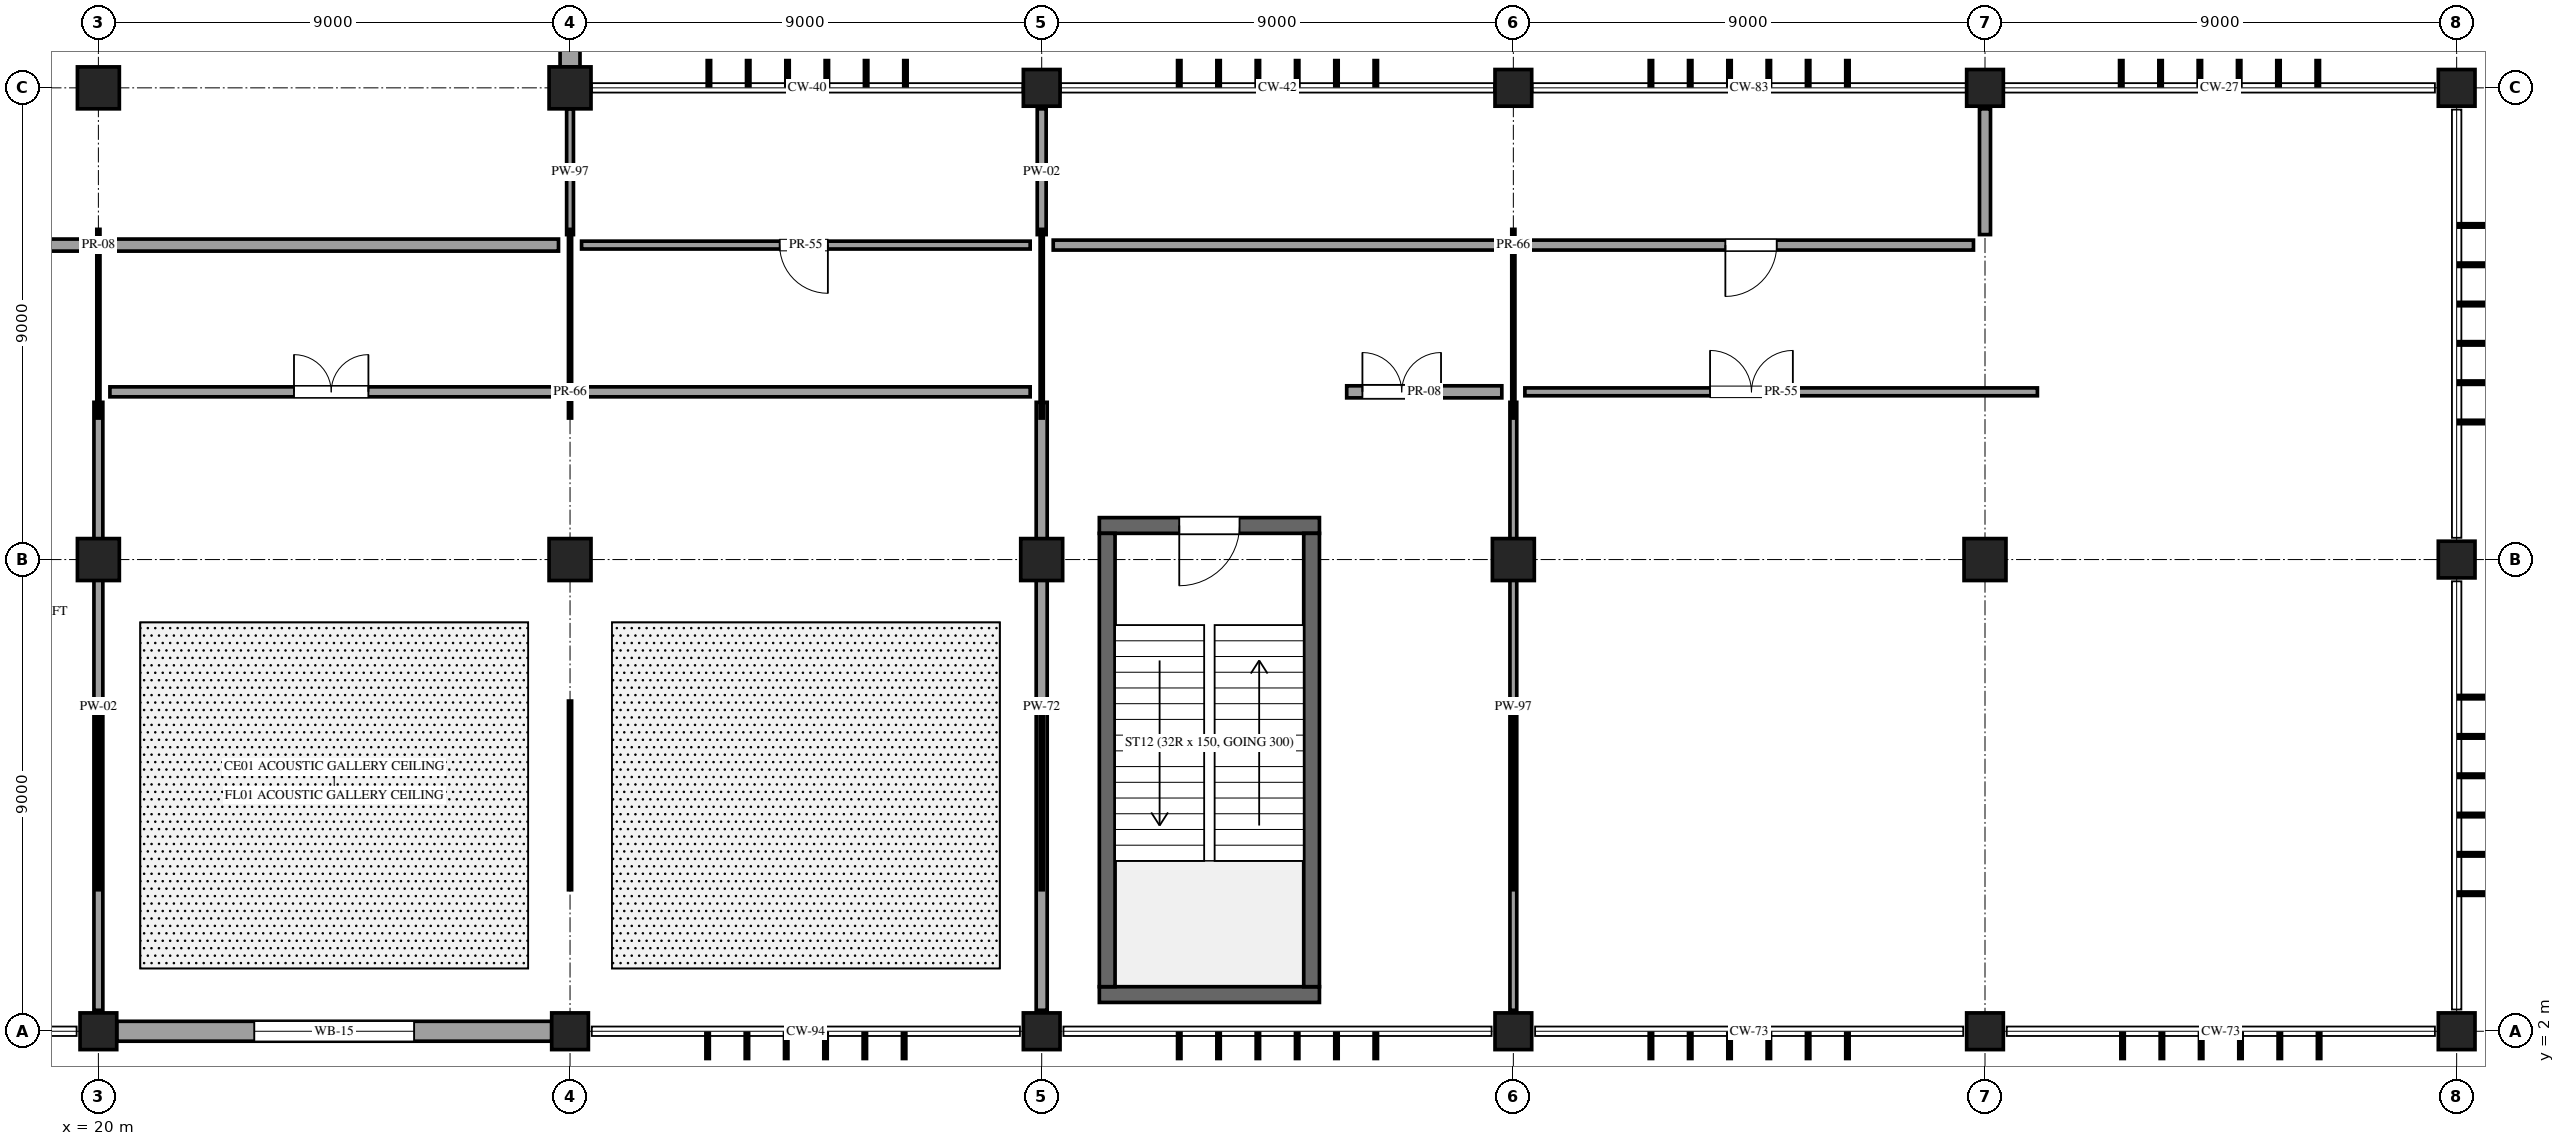
"""IFC4 building model, lengths in metres.
Left out: names, types, materials, properties, quantities, classifications, styles, units other than length and angle.
Written with IfcOpenShell. Run it as: python <this file> out.ifc"""

import sys

from ifc_helpers import new_model, si_unit, direction, frame, frame_2d, origin, origin_2d, place, context, subcontext, project, spatial, rectangle, circle, extrude, element, fill, save


model = new_model("IFC4")
c1 = context("Model", 3, precision=1e-05, world=origin(), true_north=direction((0.0, 1.0)))
c2 = subcontext(c1, "Body", "Model", "MODEL_VIEW")
j1 = project(units=[si_unit("LENGTHUNIT", "METRE"), si_unit("PLANEANGLEUNIT", "RADIAN")], contexts=[c1])
p1 = place(None, origin())
s1 = spatial("IfcSite", under=j1, at=p1, CompositionType="ELEMENT")
p2 = place(p1, origin())
s2 = spatial("IfcBuilding", under=s1, at=p2, CompositionType="ELEMENT")
p3 = place(p2, frame((0.0, 0.0, 5.4)))
s3 = spatial("IfcBuildingStorey", under=s2, at=p3, CompositionType="ELEMENT", Elevation=5.4)
p4 = place(p3, frame((20.0, 2.0, 0.0), z_axis=(0.0, 0.0, 1.0), x_axis=(1.0, 0.0, 0.0)))
e1 = element("IfcColumn", 1, at=p4, inside=s3, PredefinedType="COLUMN", context=c2, shape_type="SweptSolid", body=[
    extrude(rectangle(XDim=0.7, YDim=0.7, at=origin_2d()), origin(), (0.0, 0.0, 1.0), 4.8),
])
for number, where, z_axis, x_axis in (
    (2, (20.0, 11.0, 0.0), (0.0, 0.0, 1.0), (1.0, 0.0, 0.0)),
    (3, (20.0, 20.0, 0.0), (0.0, 0.0, 1.0), (1.0, 0.0, 0.0)),
):
    element("IfcColumn", number, at=place(p3, frame(where, z_axis=z_axis, x_axis=x_axis)), inside=s3, PredefinedType="COLUMN", context=c2, shape_type="SweptSolid", body=[
        extrude(circle(Radius=0.4, at=origin_2d()), origin(), (0.0, 0.0, 1.0), 4.8),
    ])
p5 = place(p3, frame((29.0, 2.0, 0.0), z_axis=(0.0, 0.0, 1.0), x_axis=(1.0, 0.0, 0.0)))
e4 = element("IfcColumn", 4, at=p5, inside=s3, PredefinedType="COLUMN", context=c2, shape_type="SweptSolid", body=[
    extrude(rectangle(XDim=0.7, YDim=0.7, at=origin_2d()), origin(), (0.0, 0.0, 1.0), 4.8),
])
for number, where, z_axis, x_axis in (
    (5, (29.0, 11.0, 0.0), (0.0, 0.0, 1.0), (1.0, 0.0, 0.0)),
    (6, (29.0, 20.0, 0.0), (0.0, 0.0, 1.0), (1.0, 0.0, 0.0)),
):
    element("IfcColumn", number, at=place(p3, frame(where, z_axis=z_axis, x_axis=x_axis)), inside=s3, PredefinedType="COLUMN", context=c2, shape_type="SweptSolid", body=[
        extrude(circle(Radius=0.4, at=origin_2d()), origin(), (0.0, 0.0, 1.0), 4.8),
    ])
p6 = place(p3, frame((38.0, 2.0, 0.0), z_axis=(0.0, 0.0, 1.0), x_axis=(1.0, 0.0, 0.0)))
e7 = element("IfcColumn", 7, at=p6, inside=s3, PredefinedType="COLUMN", context=c2, shape_type="SweptSolid", body=[
    extrude(rectangle(XDim=0.7, YDim=0.7, at=origin_2d()), origin(), (0.0, 0.0, 1.0), 4.8),
])
p7 = place(p3, frame((38.0, 11.0, 0.0), z_axis=(0.0, 0.0, 1.0), x_axis=(1.0, 0.0, 0.0)))
e8 = element("IfcColumn", 8, at=p7, inside=s3, PredefinedType="COLUMN", context=c2, shape_type="SweptSolid", body=[
    extrude(circle(Radius=0.4, at=origin_2d()), origin(), (0.0, 0.0, 1.0), 4.8),
])
for number, where, z_axis, x_axis in (
    (9, (38.0, 20.0, 0.0), (0.0, 0.0, 1.0), (1.0, 0.0, 0.0)),
    (10, (47.0, 2.0, 0.0), (0.0, 0.0, 1.0), (1.0, 0.0, 0.0)),
):
    element("IfcColumn", number, at=place(p3, frame(where, z_axis=z_axis, x_axis=x_axis)), inside=s3, PredefinedType="COLUMN", context=c2, shape_type="SweptSolid", body=[
        extrude(rectangle(XDim=0.7, YDim=0.7, at=origin_2d()), origin(), (0.0, 0.0, 1.0), 4.8),
    ])
p8 = place(p3, frame((47.0, 11.0, 0.0), z_axis=(0.0, 0.0, 1.0), x_axis=(1.0, 0.0, 0.0)))
e11 = element("IfcColumn", 11, at=p8, inside=s3, PredefinedType="COLUMN", context=c2, shape_type="SweptSolid", body=[
    extrude(circle(Radius=0.4, at=origin_2d()), origin(), (0.0, 0.0, 1.0), 4.8),
])
for number, where, z_axis, x_axis in (
    (12, (47.0, 20.0, 0.0), (0.0, 0.0, 1.0), (1.0, 0.0, 0.0)),
    (13, (56.0, 2.0, 0.0), (0.0, 0.0, 1.0), (1.0, 0.0, 0.0)),
):
    element("IfcColumn", number, at=place(p3, frame(where, z_axis=z_axis, x_axis=x_axis)), inside=s3, PredefinedType="COLUMN", context=c2, shape_type="SweptSolid", body=[
        extrude(rectangle(XDim=0.7, YDim=0.7, at=origin_2d()), origin(), (0.0, 0.0, 1.0), 4.8),
    ])
p9 = place(p3, frame((56.0, 11.0, 0.0), z_axis=(0.0, 0.0, 1.0), x_axis=(1.0, 0.0, 0.0)))
e14 = element("IfcColumn", 14, at=p9, inside=s3, PredefinedType="COLUMN", context=c2, shape_type="SweptSolid", body=[
    extrude(circle(Radius=0.4, at=origin_2d()), origin(), (0.0, 0.0, 1.0), 4.8),
])
for number, where, z_axis, x_axis in (
    (15, (56.0, 20.0, 0.0), (0.0, 0.0, 1.0), (1.0, 0.0, 0.0)),
    (16, (65.0, 2.0, 0.0), (0.0, 0.0, 1.0), (1.0, 0.0, 0.0)),
    (17, (65.0, 11.0, 0.0), (0.0, 0.0, 1.0), (1.0, 0.0, 0.0)),
    (18, (65.0, 20.0, 0.0), (0.0, 0.0, 1.0), (1.0, 0.0, 0.0)),
):
    element("IfcColumn", number, at=place(p3, frame(where, z_axis=z_axis, x_axis=x_axis)), inside=s3, PredefinedType="COLUMN", context=c2, shape_type="SweptSolid", body=[
        extrude(rectangle(XDim=0.7, YDim=0.7, at=origin_2d()), origin(), (0.0, 0.0, 1.0), 4.8),
    ])
p10 = place(p3, frame((20.35, 2.0, 0.0), z_axis=(0.0, 0.0, 1.0), x_axis=(1.0, 0.0, 0.0)))
e19 = element("IfcWall", 19, at=p10, inside=s3, PredefinedType="STANDARD", context=c2, shape_type="SweptSolid", body=[
    extrude(rectangle(XDim=8.3, YDim=0.38, at=frame_2d((4.15, 0.0))), origin(), (0.0, 0.0, 1.0), 3.575),
])
p11 = place(p10, frame((5.675, 0.0, 0.85), z_axis=(0.0, 0.0, 1.0), x_axis=(-1.0, 0.0, 0.0)))
e20 = element("IfcOpeningElement", 20, at=p11, cuts=e19, PredefinedType="OPENING", context=c2, shape_type="SweptSolid", body=[
    extrude(rectangle(XDim=3.05, YDim=2.5, at=frame_2d((1.525, 1.25))), frame((0.0, 0.2, 0.0), z_axis=(0.0, -1.0, 0.0), x_axis=(1.0, 0.0, 0.0)), (0.0, 0.0, 1.0), 0.4),
])
p12 = place(p3, frame((29.0, 20.4, 0.0), z_axis=(0.0, 0.0, 1.0), x_axis=(0.0, 1.0, 0.0)))
e21 = element("IfcWall", 21, at=p12, inside=s3, PredefinedType="STANDARD", context=c2, shape_type="SweptSolid", body=[
    extrude(rectangle(XDim=8.45, YDim=0.38, at=frame_2d((4.225, 0.0))), origin(), (0.0, 0.0, 1.0), 3.575),
])
p13 = place(p3, frame((39.1, 11.65, 0.0), z_axis=(0.0, 0.0, 1.0), x_axis=(1.0, 0.0, 0.0)))
e22 = element("IfcWall", 22, at=p13, inside=s3, PredefinedType="SHEAR", context=c2, shape_type="SweptSolid", body=[
    extrude(rectangle(XDim=4.2, YDim=0.3, at=frame_2d((2.1, 0.0))), origin(), (0.0, 0.0, 1.0), 4.44),
])
p14 = place(p13, frame((2.675, 0.0, 0.0), z_axis=(0.0, 0.0, 1.0), x_axis=(-1.0, 0.0, 0.0)))
e23 = element("IfcOpeningElement", 23, at=p14, cuts=e22, PredefinedType="OPENING", context=c2, shape_type="SweptSolid", body=[
    extrude(rectangle(XDim=1.15, YDim=2.2, at=frame_2d((0.575, 1.1))), frame((0.0, 0.16, 0.0), z_axis=(0.0, -1.0, 0.0), x_axis=(1.0, 0.0, 0.0)), (0.0, 0.0, 1.0), 0.32),
])
p15 = place(p3, frame((39.1, 2.7, 0.0), z_axis=(0.0, 0.0, 1.0), x_axis=(1.0, 0.0, 0.0)))
e24 = element("IfcWall", 24, at=p15, inside=s3, PredefinedType="SHEAR", context=c2, shape_type="SweptSolid", body=[
    extrude(rectangle(XDim=4.2, YDim=0.3, at=frame_2d((2.1, 0.0))), origin(), (0.0, 0.0, 1.0), 4.44),
])
for number, where, z_axis, x_axis in (
    (25, (39.25, 2.85, 0.0), (0.0, 0.0, 1.0), (0.0, 1.0, 0.0)),
    (26, (43.15, 2.85, 0.0), (0.0, 0.0, 1.0), (0.0, 1.0, 0.0)),
):
    element("IfcWall", number, at=place(p3, frame(where, z_axis=z_axis, x_axis=x_axis)), inside=s3, PredefinedType="SHEAR", context=c2, shape_type="SweptSolid", body=[
        extrude(rectangle(XDim=8.65, YDim=0.3, at=frame_2d((4.325, 0.0))), origin(), (0.0, 0.0, 1.0), 4.44),
    ])
p16 = place(p3, frame((20.0, 2.4, 0.0), z_axis=(0.0, 0.0, 1.0), x_axis=(0.0, 1.0, 0.0)))
e27 = element("IfcWall", 27, at=p16, inside=s3, PredefinedType="PARTITIONING", context=c2, shape_type="SweptSolid", body=[
    extrude(rectangle(XDim=11.6, YDim=0.17, at=frame_2d((5.8, 0.0))), origin(), (0.0, 0.0, 1.0), 3.575),
])
p17 = place(p3, frame((20.22, 14.2, 0.0), z_axis=(0.0, 0.0, 1.0), x_axis=(1.0, 0.0, 0.0)))
e28 = element("IfcWall", 28, at=p17, inside=s3, PredefinedType="PARTITIONING", context=c2, shape_type="SweptSolid", body=[
    extrude(rectangle(XDim=17.56, YDim=0.19, at=frame_2d((8.78, 0.0))), origin(), (0.0, 0.0, 1.0), 3.575),
])
p18 = place(p17, frame((3.512, 0.0, 0.0)))
e29 = element("IfcOpeningElement", 29, at=p18, cuts=e28, PredefinedType="OPENING", context=c2, shape_type="SweptSolid", body=[
    extrude(rectangle(XDim=1.42, YDim=2.3, at=frame_2d((0.71, 1.15))), frame((0.0, 0.105, 0.0), z_axis=(0.0, -1.0, 0.0), x_axis=(1.0, 0.0, 0.0)), (0.0, 0.0, 1.0), 0.21),
])
p19 = place(p3, frame((38.0, 2.4, 0.0), z_axis=(0.0, 0.0, 1.0), x_axis=(0.0, 1.0, 0.0)))
e30 = element("IfcWall", 30, at=p19, inside=s3, PredefinedType="PARTITIONING", context=c2, shape_type="SweptSolid", body=[
    extrude(rectangle(XDim=11.6, YDim=0.21, at=frame_2d((5.8, 0.0))), origin(), (0.0, 0.0, 1.0), 3.575),
])
p20 = place(p3, frame((43.82, 14.2, 0.0), z_axis=(0.0, 0.0, 1.0), x_axis=(1.0, 0.0, 0.0)))
e31 = element("IfcWall", 31, at=p20, inside=s3, PredefinedType="PARTITIONING", context=c2, shape_type="SweptSolid", body=[
    extrude(rectangle(XDim=2.96, YDim=0.23, at=frame_2d((1.48, 0.0))), origin(), (0.0, 0.0, 1.0), 3.575),
])
p21 = place(p20, frame((0.3, 0.0, 0.0)))
e32 = element("IfcOpeningElement", 32, at=p21, cuts=e31, PredefinedType="OPENING", context=c2, shape_type="SweptSolid", body=[
    extrude(rectangle(XDim=1.5, YDim=2.35, at=frame_2d((0.75, 1.175))), frame((0.0, 0.125, 0.0), z_axis=(0.0, -1.0, 0.0), x_axis=(1.0, 0.0, 0.0)), (0.0, 0.0, 1.0), 0.25),
])
p22 = place(p3, frame((47.0, 2.4, 0.0), z_axis=(0.0, 0.0, 1.0), x_axis=(0.0, 1.0, 0.0)))
e33 = element("IfcWall", 33, at=p22, inside=s3, PredefinedType="PARTITIONING", context=c2, shape_type="SweptSolid", body=[
    extrude(rectangle(XDim=11.6, YDim=0.13, at=frame_2d((5.8, 0.0))), origin(), (0.0, 0.0, 1.0), 3.575),
])
p23 = place(p3, frame((47.22, 14.2, 0.0), z_axis=(0.0, 0.0, 1.0), x_axis=(1.0, 0.0, 0.0)))
e34 = element("IfcWall", 34, at=p23, inside=s3, PredefinedType="PARTITIONING", context=c2, shape_type="SweptSolid", body=[
    extrude(rectangle(XDim=9.78, YDim=0.15, at=frame_2d((4.89, 0.0))), origin(), (0.0, 0.0, 1.0), 3.175),
])
p24 = place(p23, frame((3.534, 0.0, 0.0)))
e35 = element("IfcOpeningElement", 35, at=p24, cuts=e34, PredefinedType="OPENING", context=c2, shape_type="SweptSolid", body=[
    extrude(rectangle(XDim=1.58, YDim=2.38, at=frame_2d((0.79, 1.19))), frame((0.0, 0.085, 0.0), z_axis=(0.0, -1.0, 0.0), x_axis=(1.0, 0.0, 0.0)), (0.0, 0.0, 1.0), 0.17),
])
p25 = place(p3, frame((11.22, 17.0, 0.0), z_axis=(0.0, 0.0, 1.0), x_axis=(1.0, 0.0, 0.0)))
e36 = element("IfcWall", 36, at=p25, inside=s3, PredefinedType="PARTITIONING", context=c2, shape_type="SweptSolid", body=[
    extrude(rectangle(XDim=17.56, YDim=0.23, at=frame_2d((8.78, 0.0))), origin(), (0.0, 0.0, 1.0), 3.575),
])
p26 = place(p25, frame((5.272, 0.0, 0.0), z_axis=(0.0, 0.0, 1.0), x_axis=(-1.0, 0.0, 0.0)))
e37 = element("IfcOpeningElement", 37, at=p26, cuts=e36, PredefinedType="OPENING", context=c2, shape_type="SweptSolid", body=[
    extrude(rectangle(XDim=1.76, YDim=2.45, at=frame_2d((0.88, 1.225))), frame((0.0, 0.125, 0.0), z_axis=(0.0, -1.0, 0.0), x_axis=(1.0, 0.0, 0.0)), (0.0, 0.0, 1.0), 0.25),
])
p27 = place(p3, frame((29.0, 17.2, 0.0), z_axis=(0.0, 0.0, 1.0), x_axis=(0.0, 1.0, 0.0)))
e38 = element("IfcWall", 38, at=p27, inside=s3, PredefinedType="PARTITIONING", context=c2, shape_type="SweptSolid", body=[
    extrude(rectangle(XDim=2.4, YDim=0.13, at=frame_2d((1.2, 0.0))), origin(), (0.0, 0.0, 1.0), 3.575),
])
p28 = place(p3, frame((29.22, 17.0, 0.0), z_axis=(0.0, 0.0, 1.0), x_axis=(1.0, 0.0, 0.0)))
e39 = element("IfcWall", 39, at=p28, inside=s3, PredefinedType="PARTITIONING", context=c2, shape_type="SweptSolid", body=[
    extrude(rectangle(XDim=8.56, YDim=0.15, at=frame_2d((4.28, 0.0))), origin(), (0.0, 0.0, 1.0), 3.575),
])
p29 = place(p28, frame((4.7, 0.0, 0.0), z_axis=(0.0, 0.0, 1.0), x_axis=(-1.0, 0.0, 0.0)))
e40 = element("IfcOpeningElement", 40, at=p29, cuts=e39, PredefinedType="OPENING", context=c2, shape_type="SweptSolid", body=[
    extrude(rectangle(XDim=0.92, YDim=2.12, at=frame_2d((0.46, 1.06))), frame((0.0, 0.085, 0.0), z_axis=(0.0, -1.0, 0.0), x_axis=(1.0, 0.0, 0.0)), (0.0, 0.0, 1.0), 0.17),
])
p30 = place(p3, frame((38.0, 17.2, 0.0), z_axis=(0.0, 0.0, 1.0), x_axis=(0.0, 1.0, 0.0)))
e41 = element("IfcWall", 41, at=p30, inside=s3, PredefinedType="PARTITIONING", context=c2, shape_type="SweptSolid", body=[
    extrude(rectangle(XDim=2.4, YDim=0.17, at=frame_2d((1.2, 0.0))), origin(), (0.0, 0.0, 1.0), 3.575),
])
p31 = place(p3, frame((38.22, 17.0, 0.0), z_axis=(0.0, 0.0, 1.0), x_axis=(1.0, 0.0, 0.0)))
e42 = element("IfcWall", 42, at=p31, inside=s3, PredefinedType="PARTITIONING", context=c2, shape_type="SweptSolid", body=[
    extrude(rectangle(XDim=17.56, YDim=0.19, at=frame_2d((8.78, 0.0))), origin(), (0.0, 0.0, 1.0), 3.175),
])
p32 = place(p31, frame((13.806, 0.0, 0.0), z_axis=(0.0, 0.0, 1.0), x_axis=(-1.0, 0.0, 0.0)))
e43 = element("IfcOpeningElement", 43, at=p32, cuts=e42, PredefinedType="OPENING", context=c2, shape_type="SweptSolid", body=[
    extrude(rectangle(XDim=0.98, YDim=2.18, at=frame_2d((0.49, 1.09))), frame((0.0, 0.105, 0.0), z_axis=(0.0, -1.0, 0.0), x_axis=(1.0, 0.0, 0.0)), (0.0, 0.0, 1.0), 0.21),
])
p33 = place(p3, frame((56.0, 17.2, 0.0), z_axis=(0.0, 0.0, 1.0), x_axis=(0.0, 1.0, 0.0)))
e44 = element("IfcWall", 44, at=p33, inside=s3, PredefinedType="PARTITIONING", context=c2, shape_type="SweptSolid", body=[
    extrude(rectangle(XDim=2.4, YDim=0.21, at=frame_2d((1.2, 0.0))), origin(), (0.0, 0.0, 1.0), 3.175),
])
p34 = place(p11, origin())
e45 = element("IfcWindow", 45, at=p34, inside=s3, PartitioningType="SINGLE_PANEL", PredefinedType="WINDOW", context=c2, shape_type="SweptSolid", body=[
    extrude(rectangle(XDim=3.05, YDim=2.5, at=frame_2d((1.525, 1.25))), frame((0.0, 0.03, 0.0), z_axis=(0.0, -1.0, 0.0), x_axis=(1.0, 0.0, 0.0)), (0.0, 0.0, 1.0), 0.06),
])
fill(e20, e45)
p35 = place(p14, origin())
e46 = element("IfcDoor", 46, at=p35, inside=s3, OperationType="SINGLE_SWING_RIGHT", PredefinedType="DOOR", context=c2, shape_type="SweptSolid", body=[
    extrude(rectangle(XDim=1.15, YDim=2.2, at=frame_2d((0.575, 1.1))), frame((0.0, 0.025, 0.0), z_axis=(0.0, -1.0, 0.0), x_axis=(1.0, 0.0, 0.0)), (0.0, 0.0, 1.0), 0.05),
])
fill(e23, e46)
p36 = place(p18, origin())
e47 = element("IfcDoor", 47, at=p36, inside=s3, OperationType="DOUBLE_DOOR_SINGLE_SWING", PredefinedType="DOOR", context=c2, shape_type="SweptSolid", body=[
    extrude(rectangle(XDim=1.42, YDim=2.3, at=frame_2d((0.71, 1.15))), frame((0.0, 0.025, 0.0), z_axis=(0.0, -1.0, 0.0), x_axis=(1.0, 0.0, 0.0)), (0.0, 0.0, 1.0), 0.05),
])
fill(e29, e47)
p37 = place(p21, origin())
e48 = element("IfcDoor", 48, at=p37, inside=s3, OperationType="DOUBLE_DOOR_SINGLE_SWING", PredefinedType="DOOR", context=c2, shape_type="SweptSolid", body=[
    extrude(rectangle(XDim=1.5, YDim=2.35, at=frame_2d((0.75, 1.175))), frame((0.0, 0.025, 0.0), z_axis=(0.0, -1.0, 0.0), x_axis=(1.0, 0.0, 0.0)), (0.0, 0.0, 1.0), 0.05),
])
fill(e32, e48)
p38 = place(p24, origin())
e49 = element("IfcDoor", 49, at=p38, inside=s3, OperationType="DOUBLE_DOOR_SINGLE_SWING", PredefinedType="DOOR", context=c2, shape_type="SweptSolid", body=[
    extrude(rectangle(XDim=1.58, YDim=2.38, at=frame_2d((0.79, 1.19))), frame((0.0, 0.025, 0.0), z_axis=(0.0, -1.0, 0.0), x_axis=(1.0, 0.0, 0.0)), (0.0, 0.0, 1.0), 0.05),
])
fill(e35, e49)
p39 = place(p29, origin())
e50 = element("IfcDoor", 50, at=p39, inside=s3, OperationType="SINGLE_SWING_LEFT", PredefinedType="DOOR", context=c2, shape_type="SweptSolid", body=[
    extrude(rectangle(XDim=0.92, YDim=2.12, at=frame_2d((0.46, 1.06))), frame((0.0, 0.025, 0.0), z_axis=(0.0, -1.0, 0.0), x_axis=(1.0, 0.0, 0.0)), (0.0, 0.0, 1.0), 0.05),
])
fill(e40, e50)
p40 = place(p32, origin())
e51 = element("IfcDoor", 51, at=p40, inside=s3, OperationType="SINGLE_SWING_RIGHT", PredefinedType="DOOR", context=c2, shape_type="SweptSolid", body=[
    extrude(rectangle(XDim=0.98, YDim=2.18, at=frame_2d((0.49, 1.09))), frame((0.0, 0.025, 0.0), z_axis=(0.0, -1.0, 0.0), x_axis=(1.0, 0.0, 0.0)), (0.0, 0.0, 1.0), 0.05),
])
fill(e43, e51)
save(model, sys.argv[1])
